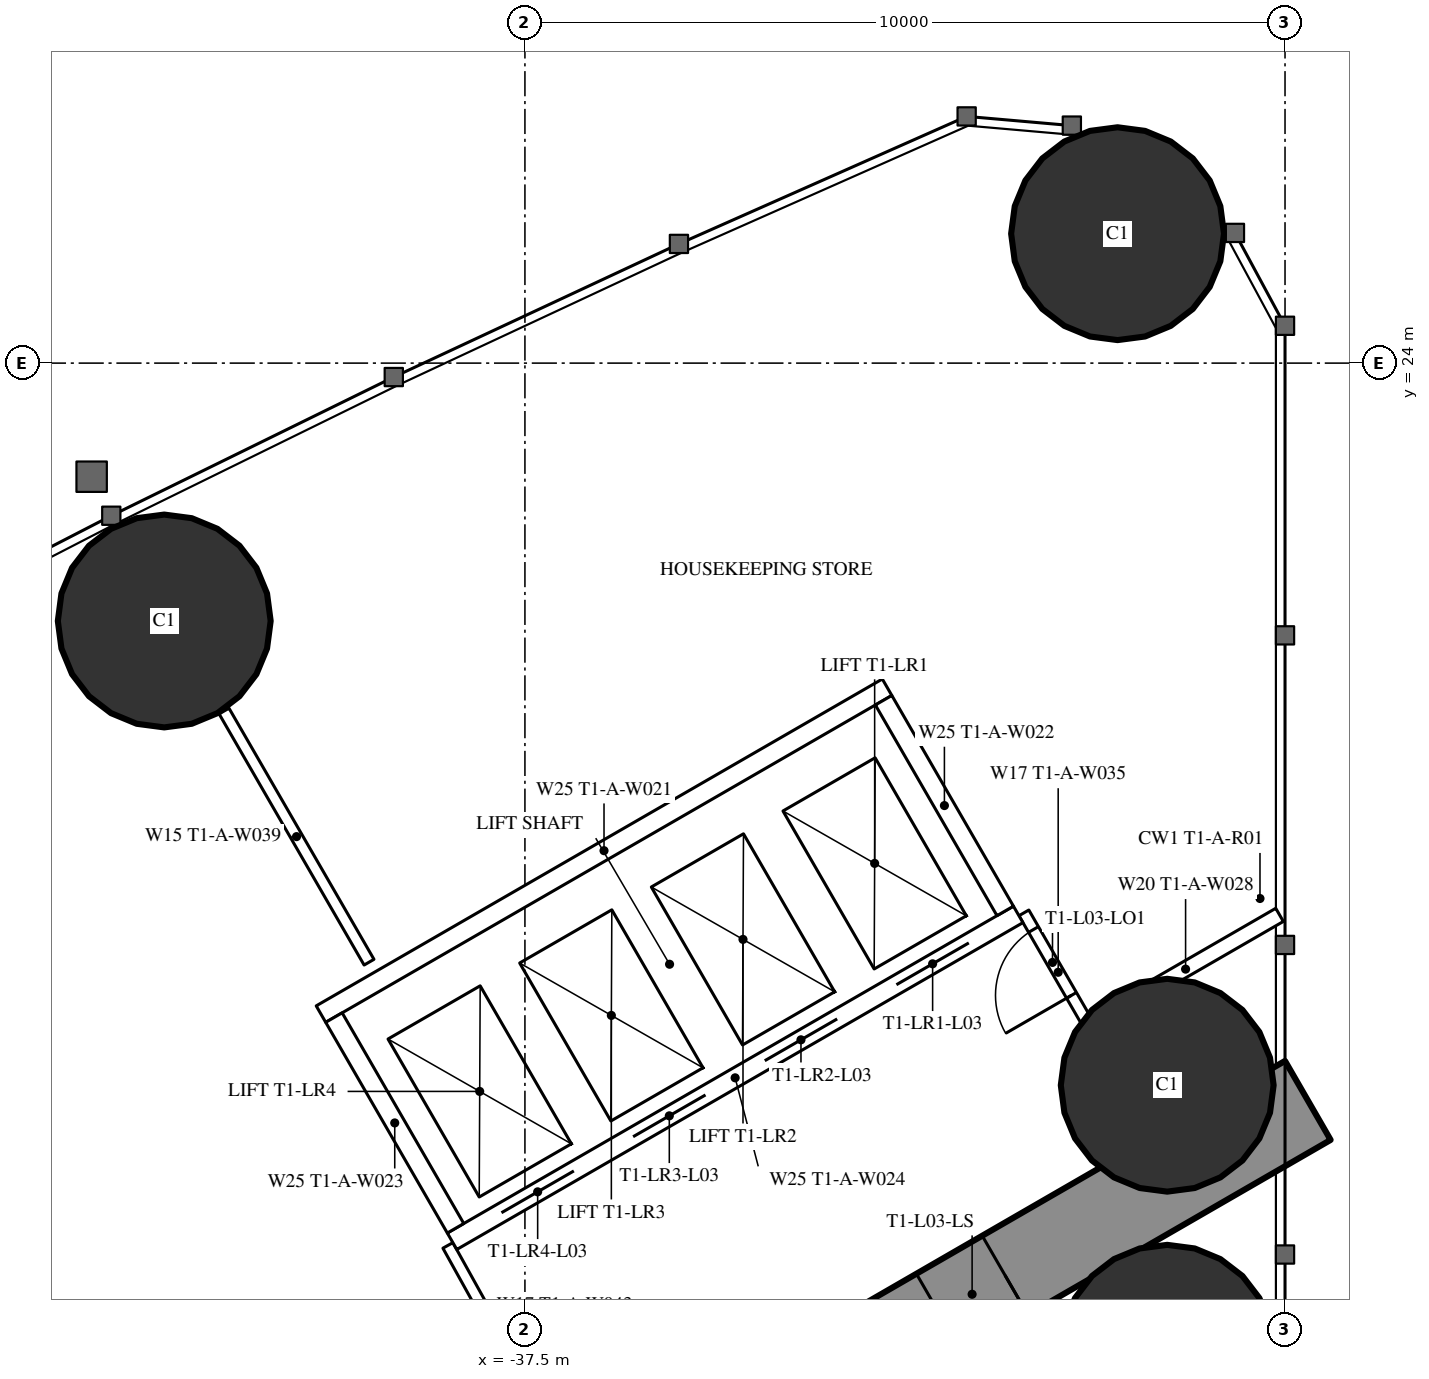
"""IFC4 building model, lengths in metres.
Left out: names, types, materials, properties, quantities, classifications, styles, units other than length and angle.
Written with IfcOpenShell. Run it as: python <this file> out.ifc"""

import sys

from ifc_helpers import new_model, si_unit, direction, frame, frame_2d, origin, origin_2d, place, context, subcontext, project, spatial, rectangle, hollow_circle, extrude, element, fill, save


model = new_model("IFC4")
c1 = context("Model", 3, precision=1e-05, world=origin(), true_north=direction((0.0, 1.0)))
c2 = subcontext(c1, "Body", "Model", "MODEL_VIEW")
j1 = project(units=[si_unit("LENGTHUNIT", "METRE"), si_unit("PLANEANGLEUNIT", "RADIAN")], contexts=[c1])
p1 = place(None, origin())
s1 = spatial("IfcSite", under=j1, at=p1, CompositionType="ELEMENT")
p2 = place(p1, origin())
s2 = spatial("IfcBuilding", under=s1, at=p2, CompositionType="ELEMENT")
p3 = place(p2, frame((0.0, 0.0, 18.0)))
s3 = spatial("IfcBuildingStorey", under=s2, at=p3, CompositionType="ELEMENT", Elevation=18.0)
for number, where, z_axis, x_axis in (
    (1, (-29.703, 25.703, 0.0), (0.0, 0.0, 1.0), (1.0, 0.0, 0.0)),
    (2, (-29.05, 11.0, 0.0), (0.0, 0.0, 1.0), (1.0, 0.0, 0.0)),
    (3, (-29.05, 14.5, 0.0), (0.0, 0.0, 1.0), (1.0, 0.0, 0.0)),
    (4, (-42.245, 20.607, 0.0), (0.0, 0.0, 1.0), (1.0, 0.0, 0.0)),
):
    element("IfcColumn", number, at=place(p3, frame(where, z_axis=z_axis, x_axis=x_axis)), inside=s3, PredefinedType="COLUMN", context=c2, shape_type="SweptSolid", body=[
        extrude(hollow_circle(Radius=1.4, WallThickness=0.12, at=origin_2d()), origin(), (0.0, 0.0, 1.0), 3.5),
    ])
p4 = place(p3, frame((-27.2, 14.3, 0.0), z_axis=(0.0, 0.0, 1.0), x_axis=(-0.866026593062, -0.499997940104, 0.0)))
e5 = element("IfcWall", 5, at=p4, inside=s3, PredefinedType="SHEAR", context=c2, shape_type="SweptSolid", body=[
    extrude(rectangle(XDim=28.946, YDim=1.2, at=frame_2d((14.473, 0.0))), origin(), (0.0, 0.0, 1.0), 3.5),
])
p5 = place(p4, frame((4.6, 0.0, 0.0)))
e6 = element("IfcOpeningElement", 6, at=p5, cuts=e5, PredefinedType="OPENING", context=c2, shape_type="SweptSolid", body=[
    extrude(rectangle(XDim=1.0, YDim=2.2, at=frame_2d((0.5, 1.1))), frame((0.0, 0.61, 0.0), z_axis=(0.0, -1.0, 0.0), x_axis=(1.0, 0.0, 0.0)), (0.0, 0.0, 1.0), 1.22),
])
p6 = place(p4, frame((13.395, 0.0, 0.0)))
e7 = element("IfcOpeningElement", 7, at=p6, cuts=e5, PredefinedType="OPENING", context=c2, shape_type="SweptSolid", body=[
    extrude(rectangle(XDim=1.8, YDim=2.2, at=frame_2d((0.9, 1.1))), frame((0.0, 0.61, 0.0), z_axis=(0.0, -1.0, 0.0), x_axis=(1.0, 0.0, 0.0)), (0.0, 0.0, 1.0), 1.22),
])
p7 = place(p3, frame((-39.551, 16.119, 0.0), z_axis=(0.0, 0.0, 1.0), x_axis=(-0.500014214979, 0.866017196607, 0.0)))
e8 = element("IfcWall", 8, at=p7, inside=s3, PredefinedType="PARTITIONING", context=c2, shape_type="SweptSolid", body=[
    extrude(rectangle(XDim=3.815, YDim=0.15, at=frame_2d((1.907, 0.0))), origin(), (0.0, 0.0, 1.0), 3.25),
])
p8 = place(p3, frame((-27.572, 16.741, 0.0), z_axis=(0.0, 0.0, 1.0), x_axis=(-0.866034618596, -0.499984039138, 0.0)))
e9 = element("IfcWall", 9, at=p8, inside=s3, PredefinedType="PARTITIONING", context=c2, shape_type="SweptSolid", body=[
    extrude(rectangle(XDim=2.854, YDim=0.2, at=frame_2d((1.427, 0.0))), origin(), (0.0, 0.0, 1.0), 3.25),
])
p9 = place(p3, frame((-38.513, 12.392, 0.0), z_axis=(0.0, 0.0, 1.0), x_axis=(0.485585508183, -0.874189175317, 0.0)))
e10 = element("IfcWall", 10, at=p9, inside=s3, PredefinedType="PARTITIONING", context=c2, shape_type="SweptSolid", body=[
    extrude(rectangle(XDim=1.805, YDim=0.15, at=frame_2d((0.902, 0.0))), origin(), (0.0, 0.0, 1.0), 3.25),
])
p10 = place(p3, frame((-30.033, 15.205, 0.0), z_axis=(0.0, 0.0, 1.0), x_axis=(-0.499980071345, 0.866036909293, 0.0)))
e11 = element("IfcWall", 11, at=p10, inside=s3, PredefinedType="PARTITIONING", context=c2, shape_type="SweptSolid", body=[
    extrude(rectangle(XDim=1.805, YDim=0.15, at=frame_2d((0.902, 0.0))), origin(), (0.0, 0.0, 1.0), 3.25),
])
p11 = place(p10, frame((0.552, 0.0, 0.0)))
e12 = element("IfcOpeningElement", 12, at=p11, cuts=e11, PredefinedType="OPENING", context=c2, shape_type="SweptSolid", body=[
    extrude(rectangle(XDim=1.0, YDim=2.2, at=frame_2d((0.5, 1.1))), frame((0.0, 0.085, 0.0), z_axis=(0.0, -1.0, 0.0), x_axis=(1.0, 0.0, 0.0)), (0.0, 0.0, 1.0), 0.17),
])
p12 = place(p3, frame((-31.01, 16.747, 0.0), z_axis=(0.0, 0.0, 1.0), x_axis=(-0.866028165386, -0.499995216735, 0.0)))
e13 = element("IfcWall", 13, at=p12, inside=s3, PredefinedType="PARTITIONING", context=c2, shape_type="SweptSolid", body=[
    extrude(rectangle(XDim=8.6, YDim=0.25, at=frame_2d((4.3, 0.0))), origin(), (0.0, 0.0, 1.0), 3.25),
])
p13 = place(p12, frame((0.75, 0.0, 0.0)))
e14 = element("IfcOpeningElement", 14, at=p13, cuts=e13, PredefinedType="OPENING", context=c2, shape_type="SweptSolid", body=[
    extrude(rectangle(XDim=1.1, YDim=2.2, at=frame_2d((0.55, 1.1))), frame((0.0, 0.135, 0.0), z_axis=(0.0, -1.0, 0.0), x_axis=(1.0, 0.0, 0.0)), (0.0, 0.0, 1.0), 0.27),
])
p14 = place(p12, frame((2.75, 0.0, 0.0)))
e15 = element("IfcOpeningElement", 15, at=p14, cuts=e13, PredefinedType="OPENING", context=c2, shape_type="SweptSolid", body=[
    extrude(rectangle(XDim=1.1, YDim=2.2, at=frame_2d((0.55, 1.1))), frame((0.0, 0.135, 0.0), z_axis=(0.0, -1.0, 0.0), x_axis=(1.0, 0.0, 0.0)), (0.0, 0.0, 1.0), 0.27),
])
p15 = place(p12, frame((4.75, 0.0, 0.0)))
e16 = element("IfcOpeningElement", 16, at=p15, cuts=e13, PredefinedType="OPENING", context=c2, shape_type="SweptSolid", body=[
    extrude(rectangle(XDim=1.1, YDim=2.2, at=frame_2d((0.55, 1.1))), frame((0.0, 0.135, 0.0), z_axis=(0.0, -1.0, 0.0), x_axis=(1.0, 0.0, 0.0)), (0.0, 0.0, 1.0), 0.27),
])
p16 = place(p12, frame((6.75, 0.0, 0.0)))
e17 = element("IfcOpeningElement", 17, at=p16, cuts=e13, PredefinedType="OPENING", context=c2, shape_type="SweptSolid", body=[
    extrude(rectangle(XDim=1.1, YDim=2.2, at=frame_2d((0.55, 1.1))), frame((0.0, 0.135, 0.0), z_axis=(0.0, -1.0, 0.0), x_axis=(1.0, 0.0, 0.0)), (0.0, 0.0, 1.0), 0.27),
])
p17 = place(p3, frame((-32.736, 19.736, 0.0), z_axis=(0.0, 0.0, 1.0), x_axis=(-0.866028165386, -0.499995216735, 0.0)))
e18 = element("IfcWall", 18, at=p17, inside=s3, PredefinedType="PARTITIONING", context=c2, shape_type="SweptSolid", body=[
    extrude(rectangle(XDim=8.6, YDim=0.25, at=frame_2d((4.3, 0.0))), origin(), (0.0, 0.0, 1.0), 3.25),
])
p18 = place(p3, frame((-31.181, 16.793, 0.0), z_axis=(0.0, 0.0, 1.0), x_axis=(-0.499929347863, 0.866066190972, 0.0)))
e19 = element("IfcWall", 19, at=p18, inside=s3, PredefinedType="PARTITIONING", context=c2, shape_type="SweptSolid", body=[
    extrude(rectangle(XDim=3.201, YDim=0.25, at=frame_2d((1.6, 0.0))), origin(), (0.0, 0.0, 1.0), 3.25),
])
p19 = place(p3, frame((-38.413, 12.618, 0.0), z_axis=(0.0, 0.0, 1.0), x_axis=(-0.499872130319, 0.866099216793, 0.0)))
e20 = element("IfcWall", 20, at=p19, inside=s3, PredefinedType="PARTITIONING", context=c2, shape_type="SweptSolid", body=[
    extrude(rectangle(XDim=3.2, YDim=0.25, at=frame_2d((1.6, 0.0))), origin(), (0.0, 0.0, 1.0), 3.25),
])
p20 = place(p11, origin())
e21 = element("IfcDoor", 21, at=p20, inside=s3, OperationType="SINGLE_SWING_LEFT", PredefinedType="DOOR", context=c2, shape_type="SweptSolid", body=[
    extrude(rectangle(XDim=1.0, YDim=2.2, at=frame_2d((0.5, 1.1))), frame((0.0, 0.025, 0.0), z_axis=(0.0, -1.0, 0.0), x_axis=(1.0, 0.0, 0.0)), (0.0, 0.0, 1.0), 0.05),
])
fill(e12, e21)
p21 = place(p5, origin())
e22 = element("IfcDoor", 22, at=p21, inside=s3, OperationType="SINGLE_SWING_LEFT", PredefinedType="DOOR", context=c2, shape_type="SweptSolid", body=[
    extrude(rectangle(XDim=1.0, YDim=2.2, at=frame_2d((0.5, 1.1))), frame((0.0, 0.025, 0.0), z_axis=(0.0, -1.0, 0.0), x_axis=(1.0, 0.0, 0.0)), (0.0, 0.0, 1.0), 0.05),
])
fill(e6, e22)
p22 = place(p13, origin())
e23 = element("IfcDoor", 23, at=p22, inside=s3, OperationType="DOUBLE_DOOR_SLIDING", PredefinedType="USERDEFINED", context=c2, shape_type="SweptSolid", body=[
    extrude(rectangle(XDim=1.1, YDim=2.2, at=frame_2d((0.55, 1.1))), frame((0.0, 0.025, 0.0), z_axis=(0.0, -1.0, 0.0), x_axis=(1.0, 0.0, 0.0)), (0.0, 0.0, 1.0), 0.05),
])
fill(e14, e23)
p23 = place(p14, origin())
e24 = element("IfcDoor", 24, at=p23, inside=s3, OperationType="DOUBLE_DOOR_SLIDING", PredefinedType="USERDEFINED", context=c2, shape_type="SweptSolid", body=[
    extrude(rectangle(XDim=1.1, YDim=2.2, at=frame_2d((0.55, 1.1))), frame((0.0, 0.025, 0.0), z_axis=(0.0, -1.0, 0.0), x_axis=(1.0, 0.0, 0.0)), (0.0, 0.0, 1.0), 0.05),
])
fill(e15, e24)
p24 = place(p15, origin())
e25 = element("IfcDoor", 25, at=p24, inside=s3, OperationType="DOUBLE_DOOR_SLIDING", PredefinedType="USERDEFINED", context=c2, shape_type="SweptSolid", body=[
    extrude(rectangle(XDim=1.1, YDim=2.2, at=frame_2d((0.55, 1.1))), frame((0.0, 0.025, 0.0), z_axis=(0.0, -1.0, 0.0), x_axis=(1.0, 0.0, 0.0)), (0.0, 0.0, 1.0), 0.05),
])
fill(e16, e25)
p25 = place(p16, origin())
e26 = element("IfcDoor", 26, at=p25, inside=s3, OperationType="DOUBLE_DOOR_SLIDING", PredefinedType="USERDEFINED", context=c2, shape_type="SweptSolid", body=[
    extrude(rectangle(XDim=1.1, YDim=2.2, at=frame_2d((0.55, 1.1))), frame((0.0, 0.025, 0.0), z_axis=(0.0, -1.0, 0.0), x_axis=(1.0, 0.0, 0.0)), (0.0, 0.0, 1.0), 0.05),
])
fill(e17, e26)
save(model, sys.argv[1])
